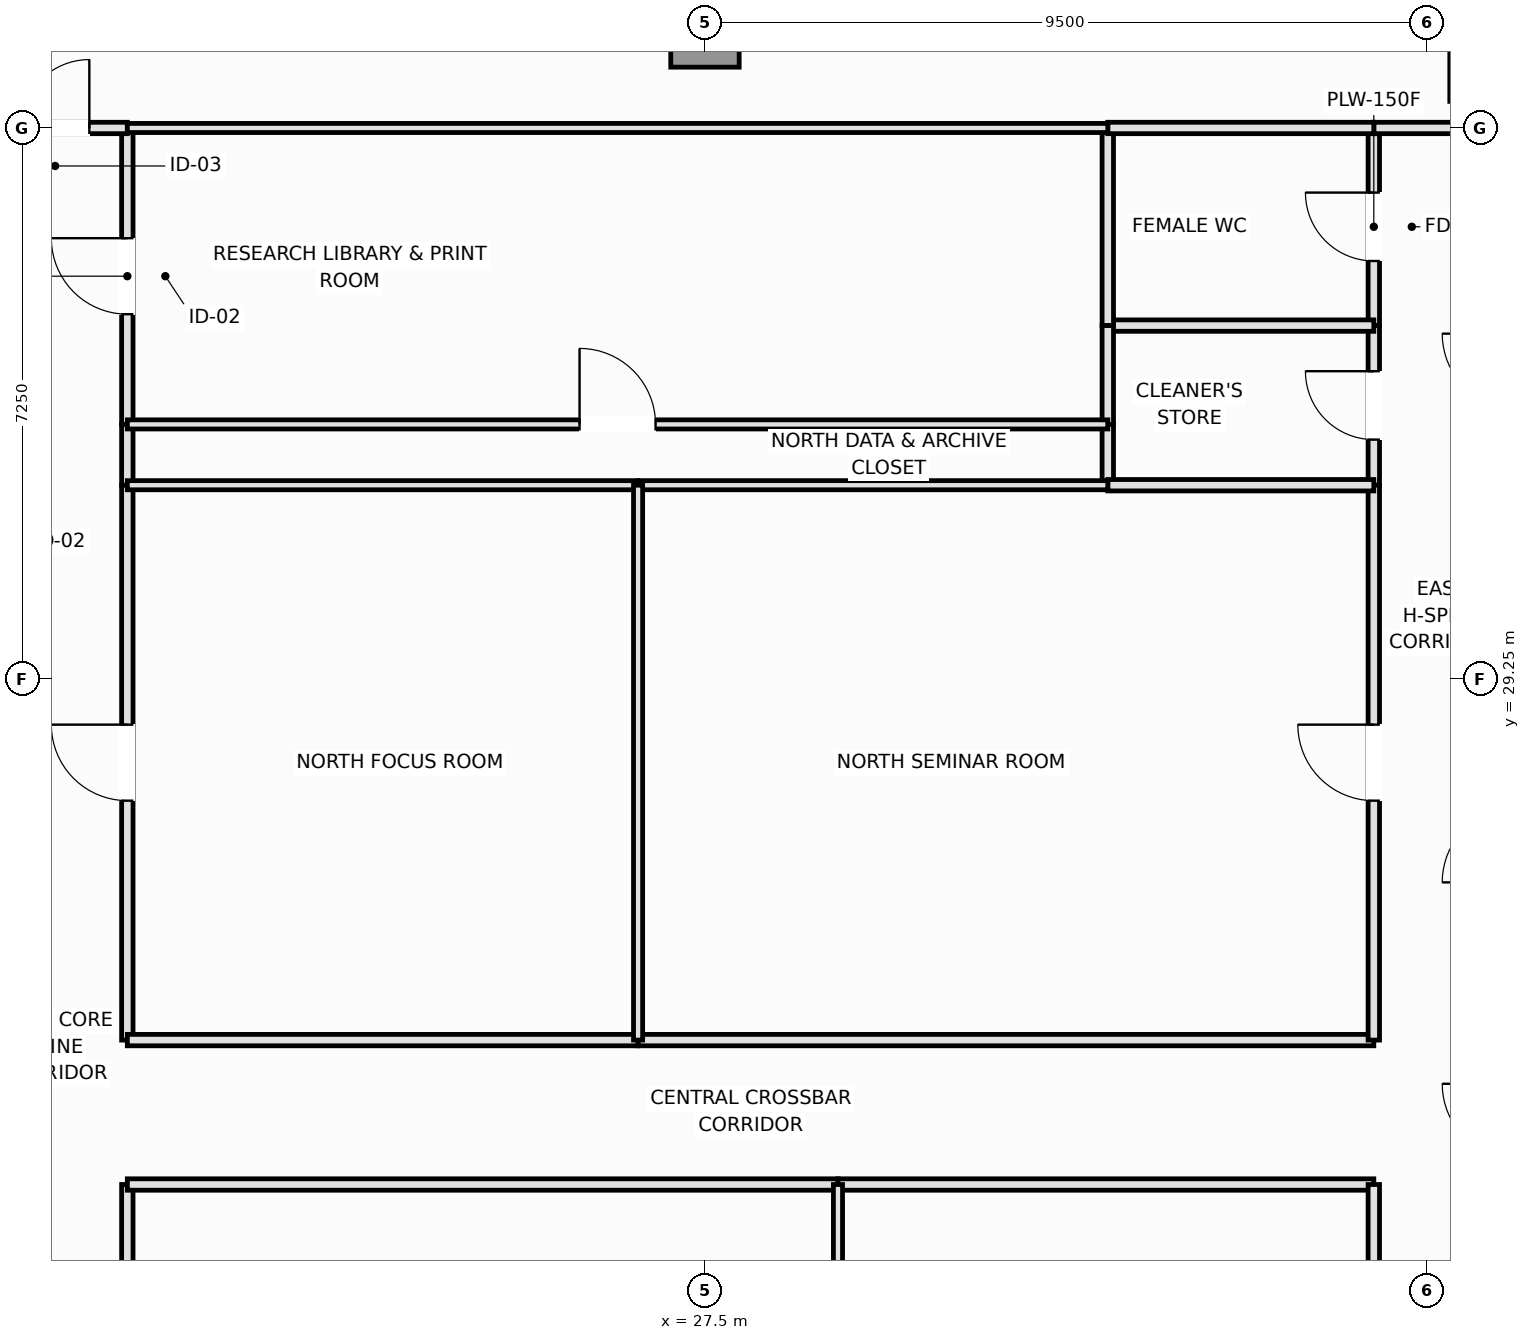
"""IFC4 building model, lengths in metres.
Left out: names, types, materials, properties, quantities, classifications, styles, units other than length and angle.
Written with IfcOpenShell. Run it as: python <this file> out.ifc"""

import sys

from ifc_helpers import new_model, si_unit, direction, frame, frame_2d, origin, origin_2d, place, context, subcontext, project, spatial, rectangle, extrude, element, fill, save


model = new_model("IFC4")
c1 = context("Model", 3, precision=1e-05, world=origin(), true_north=direction((0.0, 1.0)))
c2 = subcontext(c1, "Body", "Model", "MODEL_VIEW")
j1 = project(units=[si_unit("LENGTHUNIT", "METRE"), si_unit("PLANEANGLEUNIT", "RADIAN")], contexts=[c1])
p1 = place(None, origin())
s1 = spatial("IfcSite", under=j1, at=p1, CompositionType="ELEMENT")
p2 = place(p1, origin())
s2 = spatial("IfcBuilding", under=s1, at=p2, CompositionType="ELEMENT")
p3 = place(p2, frame((0.0, 0.0, 249.25)))
s3 = spatial("IfcBuildingStorey", under=s2, at=p3, CompositionType="ELEMENT", Elevation=249.25)
p4 = place(p3, frame((38.2, 37.75, 0.0), z_axis=(0.0, 0.0, 1.0), x_axis=(1.0, 0.0, 0.0)))
e1 = element("IfcColumn", 1, at=p4, inside=s3, PredefinedType="COLUMN", context=c2, shape_type="SweptSolid", body=[
    extrude(rectangle(XDim=1.8, YDim=1.8, at=origin_2d()), origin(), (0.0, 0.0, 1.0), 3.55),
])
p5 = place(p3, frame((27.5, 37.75, 0.0), z_axis=(0.0, 0.0, 1.0), x_axis=(1.0, 0.0, 0.0)))
e2 = element("IfcColumn", 2, at=p5, inside=s3, PredefinedType="COLUMN", context=c2, shape_type="SweptSolid", body=[
    extrude(rectangle(XDim=0.9, YDim=0.9, at=origin_2d()), origin(), (0.0, 0.0, 1.0), 3.55),
])
p6 = place(p3, frame((19.9, 32.6, 0.0), z_axis=(0.0, 0.0, 1.0), x_axis=(0.0, 1.0, 0.0)))
e3 = element("IfcWall", 3, at=p6, inside=s3, PredefinedType="PARTITIONING", context=c2, shape_type="SweptSolid", body=[
    extrude(rectangle(XDim=3.9, YDim=0.15, at=frame_2d((1.95, 0.0))), origin(), (0.0, 0.0, 1.0), 3.39),
])
p7 = place(p6, frame((1.45, 0.0, 0.0)))
e4 = element("IfcOpeningElement", 4, at=p7, cuts=e3, PredefinedType="OPENING", context=c2, shape_type="SweptSolid", body=[
    extrude(rectangle(XDim=1.0, YDim=2.15, at=frame_2d((0.5, 1.075))), frame((0.0, 0.085, 0.0), z_axis=(0.0, -1.0, 0.0), x_axis=(1.0, 0.0, 0.0)), (0.0, 0.0, 1.0), 0.17),
])
p8 = place(p3, frame((19.9, 31.8, 0.0), z_axis=(0.0, 0.0, 1.0), x_axis=(0.0, 1.0, 0.0)))
e5 = element("IfcWall", 5, at=p8, inside=s3, PredefinedType="PARTITIONING", context=c2, shape_type="SweptSolid", body=[
    extrude(rectangle(XDim=0.8, YDim=0.15, at=frame_2d((0.4, 0.0))), origin(), (0.0, 0.0, 1.0), 3.39),
])
p9 = place(p3, frame((19.9, 18.7, 0.0), z_axis=(0.0, 0.0, 1.0), x_axis=(0.0, 1.0, 0.0)))
e6 = element("IfcWall", 6, at=p9, inside=s3, PredefinedType="PARTITIONING", context=c2, shape_type="SweptSolid", body=[
    extrude(rectangle(XDim=3.9, YDim=0.15, at=frame_2d((1.95, 0.0))), origin(), (0.0, 0.0, 1.0), 3.39),
])
p10 = place(p9, frame((1.45, 0.0, 0.0)))
e7 = element("IfcOpeningElement", 7, at=p10, cuts=e6, PredefinedType="OPENING", context=c2, shape_type="SweptSolid", body=[
    extrude(rectangle(XDim=1.0, YDim=2.15, at=frame_2d((0.5, 1.075))), frame((0.0, 0.085, 0.0), z_axis=(0.0, -1.0, 0.0), x_axis=(1.0, 0.0, 0.0)), (0.0, 0.0, 1.0), 0.17),
])
p11 = place(p3, frame((19.9, 24.5, 0.0), z_axis=(0.0, 0.0, 1.0), x_axis=(0.0, 1.0, 0.0)))
e8 = element("IfcWall", 8, at=p11, inside=s3, PredefinedType="PARTITIONING", context=c2, shape_type="SweptSolid", body=[
    extrude(rectangle(XDim=7.3, YDim=0.15, at=frame_2d((3.65, 0.0))), origin(), (0.0, 0.0, 1.0), 3.39),
])
p12 = place(p11, frame((3.15, 0.0, 0.0)))
e9 = element("IfcOpeningElement", 9, at=p12, cuts=e8, PredefinedType="OPENING", context=c2, shape_type="SweptSolid", body=[
    extrude(rectangle(XDim=1.0, YDim=2.15, at=frame_2d((0.5, 1.075))), frame((0.0, 0.085, 0.0), z_axis=(0.0, -1.0, 0.0), x_axis=(1.0, 0.0, 0.0)), (0.0, 0.0, 1.0), 0.17),
])
p13 = place(p3, frame((18.0, 36.5, 0.0), z_axis=(0.0, 0.0, 1.0), x_axis=(1.0, 0.0, 0.0)))
e10 = element("IfcWall", 10, at=p13, inside=s3, PredefinedType="PARTITIONING", context=c2, shape_type="SweptSolid", body=[
    extrude(rectangle(XDim=1.9, YDim=0.15, at=frame_2d((0.95, 0.0))), origin(), (0.0, 0.0, 1.0), 3.39),
])
p14 = place(p13, frame((0.5, 0.0, 0.0)))
e11 = element("IfcOpeningElement", 11, at=p14, cuts=e10, PredefinedType="OPENING", context=c2, shape_type="SweptSolid", body=[
    extrude(rectangle(XDim=0.9, YDim=2.1, at=frame_2d((0.45, 1.05))), frame((0.0, 0.085, 0.0), z_axis=(0.0, -1.0, 0.0), x_axis=(1.0, 0.0, 0.0)), (0.0, 0.0, 1.0), 0.17),
])
p15 = place(p3, frame((19.9, 22.6, 0.0), z_axis=(0.0, 0.0, 1.0), x_axis=(1.0, 0.0, 0.0)))
e12 = element("IfcWall", 12, at=p15, inside=s3, PredefinedType="PARTITIONING", context=c2, shape_type="SweptSolid", body=[
    extrude(rectangle(XDim=9.35, YDim=0.15, at=frame_2d((4.675, 0.0))), origin(), (0.0, 0.0, 1.0), 3.39),
])
p16 = place(p3, frame((29.25, 22.6, 0.0), z_axis=(0.0, 0.0, 1.0), x_axis=(1.0, 0.0, 0.0)))
e13 = element("IfcWall", 13, at=p16, inside=s3, PredefinedType="PARTITIONING", context=c2, shape_type="SweptSolid", body=[
    extrude(rectangle(XDim=7.05, YDim=0.15, at=frame_2d((3.525, 0.0))), origin(), (0.0, 0.0, 1.0), 3.39),
])
p17 = place(p3, frame((19.9, 24.5, 0.0), z_axis=(0.0, 0.0, 1.0), x_axis=(1.0, 0.0, 0.0)))
e14 = element("IfcWall", 14, at=p17, inside=s3, PredefinedType="PARTITIONING", context=c2, shape_type="SweptSolid", body=[
    extrude(rectangle(XDim=6.72, YDim=0.15, at=frame_2d((3.36, 0.0))), origin(), (0.0, 0.0, 1.0), 3.39),
])
p18 = place(p3, frame((26.62, 24.5, 0.0), z_axis=(0.0, 0.0, 1.0), x_axis=(1.0, 0.0, 0.0)))
e15 = element("IfcWall", 15, at=p18, inside=s3, PredefinedType="PARTITIONING", context=c2, shape_type="SweptSolid", body=[
    extrude(rectangle(XDim=9.68, YDim=0.15, at=frame_2d((4.84, 0.0))), origin(), (0.0, 0.0, 1.0), 3.39),
])
p19 = place(p3, frame((36.3, 33.9, 0.0), z_axis=(0.0, 0.0, 1.0), x_axis=(0.0, 1.0, 0.0)))
e16 = element("IfcWall", 16, at=p19, inside=s3, PredefinedType="PLUMBINGWALL", context=c2, shape_type="SweptSolid", body=[
    extrude(rectangle(XDim=2.6, YDim=0.15, at=frame_2d((1.3, 0.0))), origin(), (0.0, 0.0, 1.0), 3.39),
])
p20 = place(p19, frame((0.85, 0.0, 0.0)))
e17 = element("IfcOpeningElement", 17, at=p20, cuts=e16, PredefinedType="OPENING", context=c2, shape_type="SweptSolid", body=[
    extrude(rectangle(XDim=0.9, YDim=2.1, at=frame_2d((0.45, 1.05))), frame((0.0, 0.085, 0.0), z_axis=(0.0, -1.0, 0.0), x_axis=(1.0, 0.0, 0.0)), (0.0, 0.0, 1.0), 0.17),
])
p21 = place(p3, frame((36.3, 31.8, 0.0), z_axis=(0.0, 0.0, 1.0), x_axis=(0.0, 1.0, 0.0)))
e18 = element("IfcWall", 18, at=p21, inside=s3, PredefinedType="PLUMBINGWALL", context=c2, shape_type="SweptSolid", body=[
    extrude(rectangle(XDim=2.1, YDim=0.15, at=frame_2d((1.05, 0.0))), origin(), (0.0, 0.0, 1.0), 3.39),
])
p22 = place(p21, frame((0.6, 0.0, 0.0)))
e19 = element("IfcOpeningElement", 19, at=p22, cuts=e18, PredefinedType="OPENING", context=c2, shape_type="SweptSolid", body=[
    extrude(rectangle(XDim=0.9, YDim=2.1, at=frame_2d((0.45, 1.05))), frame((0.0, 0.085, 0.0), z_axis=(0.0, -1.0, 0.0), x_axis=(1.0, 0.0, 0.0)), (0.0, 0.0, 1.0), 0.17),
])
p23 = place(p3, frame((36.3, 18.7, 0.0), z_axis=(0.0, 0.0, 1.0), x_axis=(0.0, 1.0, 0.0)))
e20 = element("IfcWall", 20, at=p23, inside=s3, PredefinedType="PARTITIONING", context=c2, shape_type="SweptSolid", body=[
    extrude(rectangle(XDim=3.9, YDim=0.15, at=frame_2d((1.95, 0.0))), origin(), (0.0, 0.0, 1.0), 3.39),
])
p24 = place(p23, frame((1.45, 0.0, 0.0)))
e21 = element("IfcOpeningElement", 21, at=p24, cuts=e20, PredefinedType="OPENING", context=c2, shape_type="SweptSolid", body=[
    extrude(rectangle(XDim=1.0, YDim=2.15, at=frame_2d((0.5, 1.075))), frame((0.0, 0.085, 0.0), z_axis=(0.0, -1.0, 0.0), x_axis=(1.0, 0.0, 0.0)), (0.0, 0.0, 1.0), 0.17),
])
p25 = place(p3, frame((36.3, 24.5, 0.0), z_axis=(0.0, 0.0, 1.0), x_axis=(0.0, 1.0, 0.0)))
e22 = element("IfcWall", 22, at=p25, inside=s3, PredefinedType="PARTITIONING", context=c2, shape_type="SweptSolid", body=[
    extrude(rectangle(XDim=7.3, YDim=0.15, at=frame_2d((3.65, 0.0))), origin(), (0.0, 0.0, 1.0), 3.39),
])
p26 = place(p25, frame((3.15, 0.0, 0.0)))
e23 = element("IfcOpeningElement", 23, at=p26, cuts=e22, PredefinedType="OPENING", context=c2, shape_type="SweptSolid", body=[
    extrude(rectangle(XDim=1.0, YDim=2.15, at=frame_2d((0.5, 1.075))), frame((0.0, 0.085, 0.0), z_axis=(0.0, -1.0, 0.0), x_axis=(1.0, 0.0, 0.0)), (0.0, 0.0, 1.0), 0.17),
])
p27 = place(p3, frame((36.3, 36.5, 0.0), z_axis=(0.0, 0.0, 1.0), x_axis=(1.0, 0.0, 0.0)))
e24 = element("IfcWall", 24, at=p27, inside=s3, PredefinedType="PARTITIONING", context=c2, shape_type="SweptSolid", body=[
    extrude(rectangle(XDim=1.9, YDim=0.15, at=frame_2d((0.95, 0.0))), origin(), (0.0, 0.0, 1.0), 3.39),
])
p28 = place(p3, frame((32.8, 33.9, 0.0), z_axis=(0.0, 0.0, 1.0), x_axis=(1.0, 0.0, 0.0)))
e25 = element("IfcWall", 25, at=p28, inside=s3, PredefinedType="PLUMBINGWALL", context=c2, shape_type="SweptSolid", body=[
    extrude(rectangle(XDim=3.5, YDim=0.15, at=frame_2d((1.75, 0.0))), origin(), (0.0, 0.0, 1.0), 3.39),
])
p29 = place(p3, frame((32.8, 33.9, 0.0), z_axis=(0.0, 0.0, 1.0), x_axis=(0.0, 1.0, 0.0)))
e26 = element("IfcWall", 26, at=p29, inside=s3, PredefinedType="PLUMBINGWALL", context=c2, shape_type="SweptSolid", body=[
    extrude(rectangle(XDim=2.6, YDim=0.15, at=frame_2d((1.3, 0.0))), origin(), (0.0, 0.0, 1.0), 3.39),
])
p30 = place(p3, frame((32.8, 36.5, 0.0), z_axis=(0.0, 0.0, 1.0), x_axis=(1.0, 0.0, 0.0)))
e27 = element("IfcWall", 27, at=p30, inside=s3, PredefinedType="PLUMBINGWALL", context=c2, shape_type="SweptSolid", body=[
    extrude(rectangle(XDim=3.5, YDim=0.15, at=frame_2d((1.75, 0.0))), origin(), (0.0, 0.0, 1.0), 3.39),
])
p31 = place(p3, frame((32.8, 32.6, 0.0), z_axis=(0.0, 0.0, 1.0), x_axis=(0.0, 1.0, 0.0)))
e28 = element("IfcWall", 28, at=p31, inside=s3, PredefinedType="PLUMBINGWALL", context=c2, shape_type="SweptSolid", body=[
    extrude(rectangle(XDim=1.3, YDim=0.15, at=frame_2d((0.65, 0.0))), origin(), (0.0, 0.0, 1.0), 3.39),
])
p32 = place(p3, frame((32.8, 31.8, 0.0), z_axis=(0.0, 0.0, 1.0), x_axis=(0.0, 1.0, 0.0)))
e29 = element("IfcWall", 29, at=p32, inside=s3, PredefinedType="PLUMBINGWALL", context=c2, shape_type="SweptSolid", body=[
    extrude(rectangle(XDim=0.8, YDim=0.15, at=frame_2d((0.4, 0.0))), origin(), (0.0, 0.0, 1.0), 3.39),
])
p33 = place(p3, frame((32.8, 31.8, 0.0), z_axis=(0.0, 0.0, 1.0), x_axis=(1.0, 0.0, 0.0)))
e30 = element("IfcWall", 30, at=p33, inside=s3, PredefinedType="PLUMBINGWALL", context=c2, shape_type="SweptSolid", body=[
    extrude(rectangle(XDim=3.5, YDim=0.15, at=frame_2d((1.75, 0.0))), origin(), (0.0, 0.0, 1.0), 3.39),
])
p34 = place(p3, frame((19.9, 32.6, 0.0), z_axis=(0.0, 0.0, 1.0), x_axis=(1.0, 0.0, 0.0)))
e31 = element("IfcWall", 31, at=p34, inside=s3, PredefinedType="PARTITIONING", context=c2, shape_type="SweptSolid", body=[
    extrude(rectangle(XDim=12.9, YDim=0.12, at=frame_2d((6.45, 0.0))), origin(), (0.0, 0.0, 1.0), 3.39),
])
p35 = place(p34, frame((5.95, 0.0, 0.0)))
e32 = element("IfcOpeningElement", 32, at=p35, cuts=e31, PredefinedType="OPENING", context=c2, shape_type="SweptSolid", body=[
    extrude(rectangle(XDim=1.0, YDim=2.15, at=frame_2d((0.5, 1.075))), frame((0.0, 0.07, 0.0), z_axis=(0.0, -1.0, 0.0), x_axis=(1.0, 0.0, 0.0)), (0.0, 0.0, 1.0), 0.14),
])
p36 = place(p3, frame((19.9, 36.5, 0.0), z_axis=(0.0, 0.0, 1.0), x_axis=(1.0, 0.0, 0.0)))
e33 = element("IfcWall", 33, at=p36, inside=s3, PredefinedType="PARTITIONING", context=c2, shape_type="SweptSolid", body=[
    extrude(rectangle(XDim=12.9, YDim=0.12, at=frame_2d((6.45, 0.0))), origin(), (0.0, 0.0, 1.0), 3.39),
])
p37 = place(p3, frame((19.9, 31.8, 0.0), z_axis=(0.0, 0.0, 1.0), x_axis=(1.0, 0.0, 0.0)))
e34 = element("IfcWall", 34, at=p37, inside=s3, PredefinedType="PARTITIONING", context=c2, shape_type="SweptSolid", body=[
    extrude(rectangle(XDim=6.72, YDim=0.12, at=frame_2d((3.36, 0.0))), origin(), (0.0, 0.0, 1.0), 3.39),
])
p38 = place(p3, frame((26.62, 31.8, 0.0), z_axis=(0.0, 0.0, 1.0), x_axis=(1.0, 0.0, 0.0)))
e35 = element("IfcWall", 35, at=p38, inside=s3, PredefinedType="PARTITIONING", context=c2, shape_type="SweptSolid", body=[
    extrude(rectangle(XDim=6.18, YDim=0.12, at=frame_2d((3.09, 0.0))), origin(), (0.0, 0.0, 1.0), 3.39),
])
p39 = place(p3, frame((29.25, 18.7, 0.0), z_axis=(0.0, 0.0, 1.0), x_axis=(0.0, 1.0, 0.0)))
e36 = element("IfcWall", 36, at=p39, inside=s3, PredefinedType="PARTITIONING", context=c2, shape_type="SweptSolid", body=[
    extrude(rectangle(XDim=3.9, YDim=0.12, at=frame_2d((1.95, 0.0))), origin(), (0.0, 0.0, 1.0), 3.12),
])
p40 = place(p3, frame((26.62, 24.5, 0.0), z_axis=(0.0, 0.0, 1.0), x_axis=(0.0, 1.0, 0.0)))
e37 = element("IfcWall", 37, at=p40, inside=s3, PredefinedType="PARTITIONING", context=c2, shape_type="SweptSolid", body=[
    extrude(rectangle(XDim=7.3, YDim=0.12, at=frame_2d((3.65, 0.0))), origin(), (0.0, 0.0, 1.0), 3.39),
])
p41 = place(p7, origin())
e38 = element("IfcDoor", 38, at=p41, inside=s3, OperationType="SINGLE_SWING_RIGHT", PredefinedType="DOOR", context=c2, shape_type="SweptSolid", body=[
    extrude(rectangle(XDim=1.0, YDim=2.15, at=frame_2d((0.5, 1.075))), frame((0.0, 0.025, 0.0), z_axis=(0.0, -1.0, 0.0), x_axis=(1.0, 0.0, 0.0)), (0.0, 0.0, 1.0), 0.05),
])
fill(e4, e38)
p42 = place(p12, origin())
e39 = element("IfcDoor", 39, at=p42, inside=s3, OperationType="SINGLE_SWING_RIGHT", PredefinedType="DOOR", context=c2, shape_type="SweptSolid", body=[
    extrude(rectangle(XDim=1.0, YDim=2.15, at=frame_2d((0.5, 1.075))), frame((0.0, 0.025, 0.0), z_axis=(0.0, -1.0, 0.0), x_axis=(1.0, 0.0, 0.0)), (0.0, 0.0, 1.0), 0.05),
])
fill(e9, e39)
p43 = place(p14, origin())
e40 = element("IfcDoor", 40, at=p43, inside=s3, OperationType="SINGLE_SWING_RIGHT", PredefinedType="DOOR", context=c2, shape_type="SweptSolid", body=[
    extrude(rectangle(XDim=0.9, YDim=2.1, at=frame_2d((0.45, 1.05))), frame((0.0, 0.025, 0.0), z_axis=(0.0, -1.0, 0.0), x_axis=(1.0, 0.0, 0.0)), (0.0, 0.0, 1.0), 0.05),
])
fill(e11, e40)
p44 = place(p20, origin())
e41 = element("IfcDoor", 41, at=p44, inside=s3, OperationType="SINGLE_SWING_RIGHT", PredefinedType="DOOR", context=c2, shape_type="SweptSolid", body=[
    extrude(rectangle(XDim=0.9, YDim=2.1, at=frame_2d((0.45, 1.05))), frame((0.0, 0.025, 0.0), z_axis=(0.0, -1.0, 0.0), x_axis=(1.0, 0.0, 0.0)), (0.0, 0.0, 1.0), 0.05),
])
fill(e17, e41)
p45 = place(p22, origin())
e42 = element("IfcDoor", 42, at=p45, inside=s3, OperationType="SINGLE_SWING_RIGHT", PredefinedType="DOOR", context=c2, shape_type="SweptSolid", body=[
    extrude(rectangle(XDim=0.9, YDim=2.1, at=frame_2d((0.45, 1.05))), frame((0.0, 0.025, 0.0), z_axis=(0.0, -1.0, 0.0), x_axis=(1.0, 0.0, 0.0)), (0.0, 0.0, 1.0), 0.05),
])
fill(e19, e42)
p46 = place(p26, origin())
e43 = element("IfcDoor", 43, at=p46, inside=s3, OperationType="SINGLE_SWING_RIGHT", PredefinedType="DOOR", context=c2, shape_type="SweptSolid", body=[
    extrude(rectangle(XDim=1.0, YDim=2.15, at=frame_2d((0.5, 1.075))), frame((0.0, 0.025, 0.0), z_axis=(0.0, -1.0, 0.0), x_axis=(1.0, 0.0, 0.0)), (0.0, 0.0, 1.0), 0.05),
])
fill(e23, e43)
p47 = place(p35, origin())
e44 = element("IfcDoor", 44, at=p47, inside=s3, OperationType="SINGLE_SWING_LEFT", PredefinedType="DOOR", context=c2, shape_type="SweptSolid", body=[
    extrude(rectangle(XDim=1.0, YDim=2.15, at=frame_2d((0.5, 1.075))), frame((0.0, 0.025, 0.0), z_axis=(0.0, -1.0, 0.0), x_axis=(1.0, 0.0, 0.0)), (0.0, 0.0, 1.0), 0.05),
])
fill(e32, e44)
save(model, sys.argv[1])
